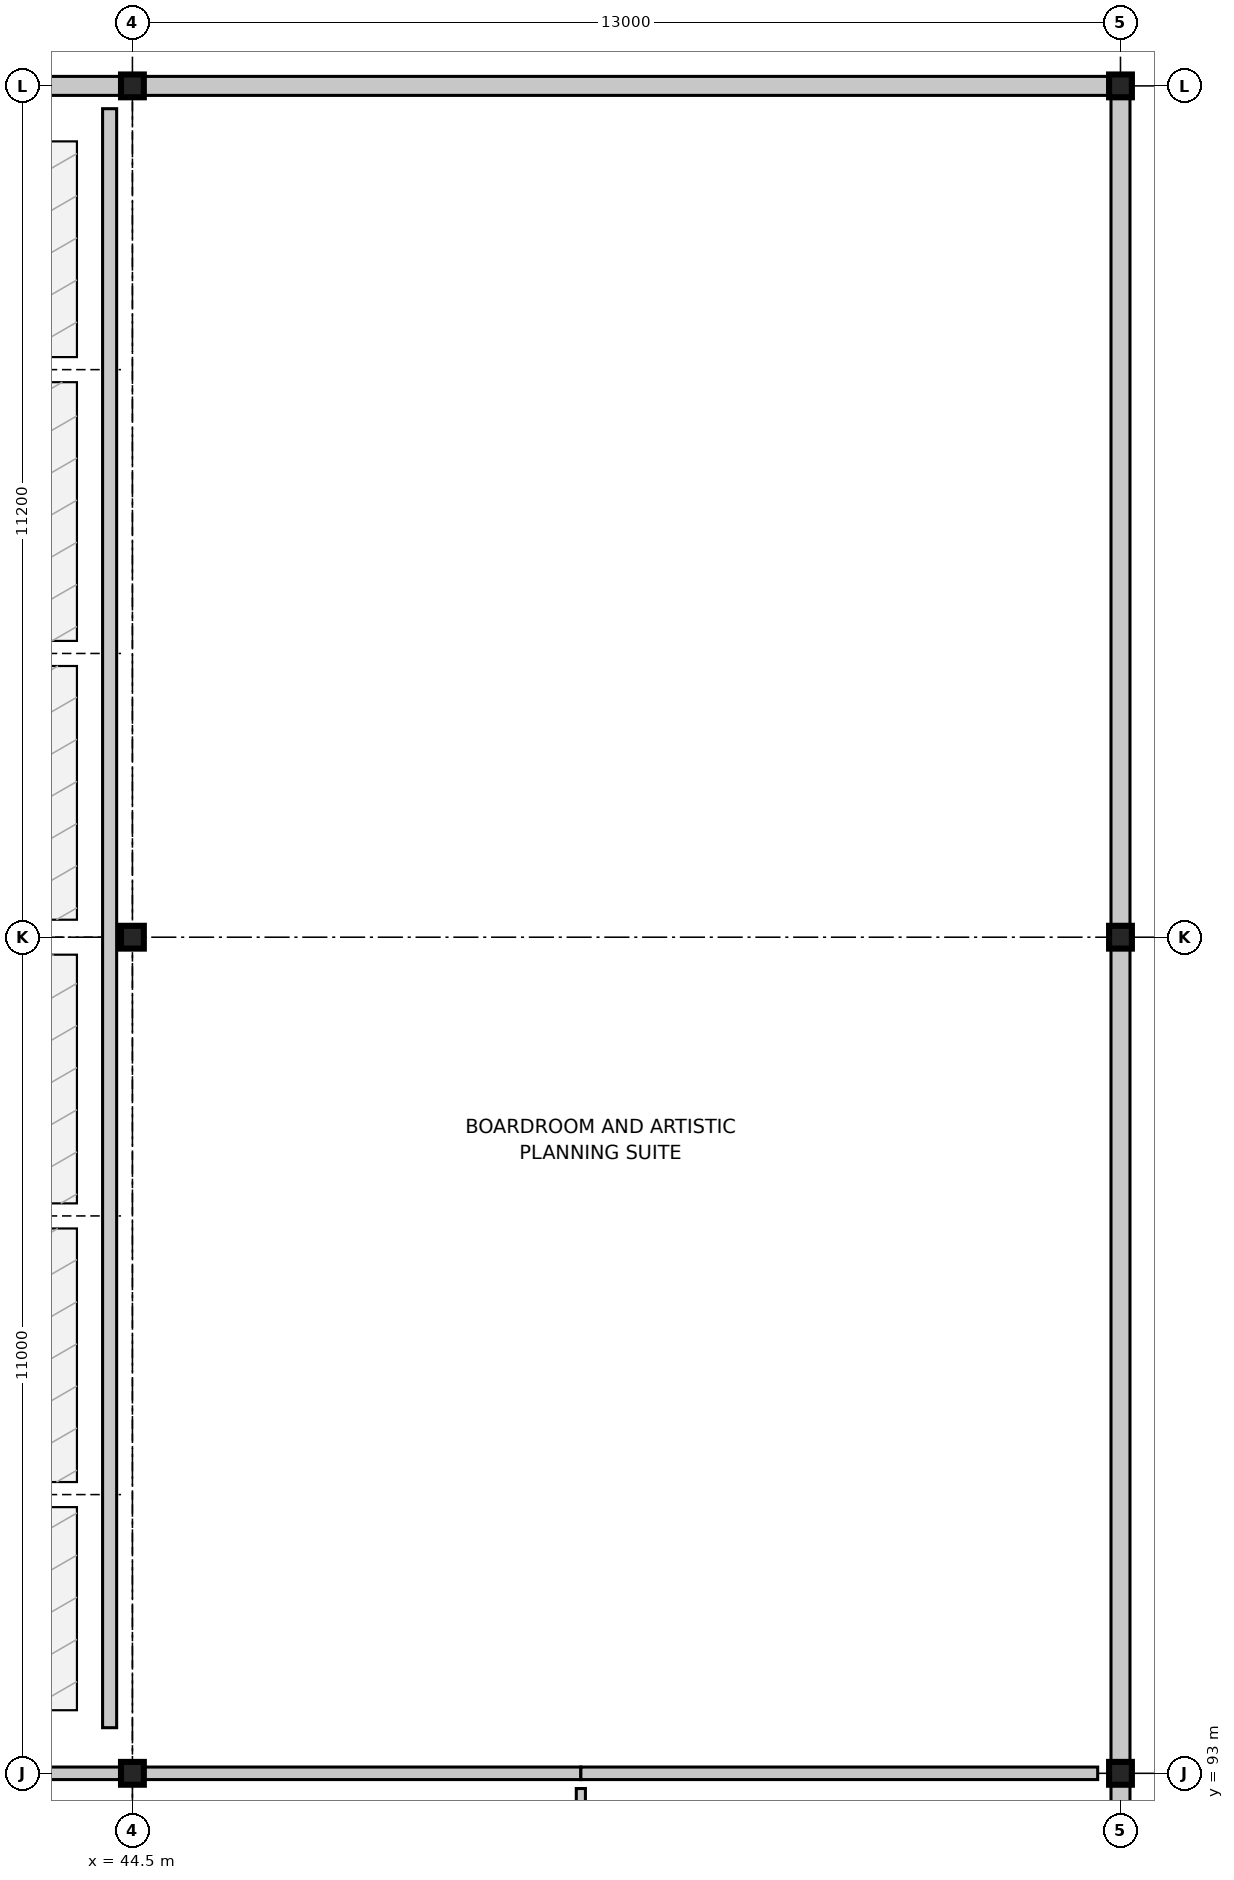
"""IFC4 building model, lengths in metres.
Left out: names, types, materials, properties, quantities, classifications, styles, units other than length and angle.
Written with IfcOpenShell. Run it as: python <this file> out.ifc"""

import sys

from ifc_helpers import new_model, si_unit, direction, frame, frame_2d, origin, origin_2d, place, context, subcontext, project, spatial, rectangle, hollow_rectangle, i_section, extrude, element, fill, save


model = new_model("IFC4")
c1 = context("Model", 3, precision=1e-05, world=origin(), true_north=direction((0.0, 1.0)))
c2 = subcontext(c1, "Body", "Model", "MODEL_VIEW")
j1 = project(units=[si_unit("LENGTHUNIT", "METRE"), si_unit("PLANEANGLEUNIT", "RADIAN")], contexts=[c1])
p1 = place(None, origin())
s1 = spatial("IfcSite", under=j1, at=p1, CompositionType="ELEMENT")
p2 = place(p1, origin())
s2 = spatial("IfcBuilding", under=s1, at=p2, CompositionType="ELEMENT")
p3 = place(p2, frame((0.0, 0.0, 9.6)))
s3 = spatial("IfcBuildingStorey", under=s2, at=p3, CompositionType="ELEMENT", Elevation=9.6)
p4 = place(p3, frame((44.5, 93.0, 0.0), z_axis=(0.0, 0.0, 1.0), x_axis=(1.0, 0.0, 0.0)))
e1 = element("IfcColumn", 1, at=p4, inside=s3, PredefinedType="COLUMN", context=c2, shape_type="SweptSolid", body=[
    extrude(i_section(OverallWidth=0.3, OverallDepth=0.3, WebThickness=0.011, FlangeThickness=0.019, FilletRadius=0.027, at=origin_2d()), origin(), (0.0, 0.0, 1.0), 4.8),
])
p5 = place(p3, frame((44.5, 104.0, 0.0), z_axis=(0.0, 0.0, 1.0), x_axis=(1.0, 0.0, 0.0)))
e2 = element("IfcColumn", 2, at=p5, inside=s3, PredefinedType="COLUMN", context=c2, shape_type="SweptSolid", body=[
    extrude(hollow_rectangle(XDim=0.3, YDim=0.3, WallThickness=0.016, at=origin_2d()), origin(), (0.0, 0.0, 1.0), 4.8),
])
for number, where, z_axis, x_axis in (
    (3, (44.5, 115.2, 0.0), (0.0, 0.0, 1.0), (1.0, 0.0, 0.0)),
    (4, (57.5, 93.0, 0.0), (0.0, 0.0, 1.0), (1.0, 0.0, 0.0)),
    (5, (57.5, 104.0, 0.0), (0.0, 0.0, 1.0), (1.0, 0.0, 0.0)),
):
    element("IfcColumn", number, at=place(p3, frame(where, z_axis=z_axis, x_axis=x_axis)), inside=s3, PredefinedType="COLUMN", context=c2, shape_type="SweptSolid", body=[
        extrude(i_section(OverallWidth=0.3, OverallDepth=0.3, WebThickness=0.011, FlangeThickness=0.019, FilletRadius=0.027, at=origin_2d()), origin(), (0.0, 0.0, 1.0), 4.8),
    ])
p6 = place(p3, frame((57.5, 115.2, 0.0), z_axis=(0.0, 0.0, 1.0), x_axis=(1.0, 0.0, 0.0)))
e6 = element("IfcColumn", 6, at=p6, inside=s3, PredefinedType="COLUMN", context=c2, shape_type="SweptSolid", body=[
    extrude(hollow_rectangle(XDim=0.3, YDim=0.3, WallThickness=0.016, at=origin_2d()), origin(), (0.0, 0.0, 1.0), 4.78),
])
p7 = place(p3, frame((57.5, 92.98, 0.0), z_axis=(0.0, 0.0, 1.0), x_axis=(0.0, -1.0, 0.0)))
e7 = element("IfcWall", 7, at=p7, inside=s3, PredefinedType="SOLIDWALL", context=c2, shape_type="SweptSolid", body=[
    extrude(rectangle(XDim=10.96, YDim=0.25, at=frame_2d((5.48, 0.0))), origin(), (0.0, 0.0, 1.0), 4.028),
])
p8 = place(p3, frame((57.5, 103.98, 0.0), z_axis=(0.0, 0.0, 1.0), x_axis=(0.0, -1.0, 0.0)))
e8 = element("IfcWall", 8, at=p8, inside=s3, PredefinedType="SOLIDWALL", context=c2, shape_type="SweptSolid", body=[
    extrude(rectangle(XDim=10.96, YDim=0.25, at=frame_2d((5.48, 0.0))), origin(), (0.0, 0.0, 1.0), 4.19),
])
p9 = place(p8, frame((4.655, 0.0, 0.9)))
e9 = element("IfcOpeningElement", 9, at=p9, cuts=e8, PredefinedType="OPENING", context=c2, shape_type="SweptSolid", body=[
    extrude(rectangle(XDim=1.65, YDim=1.55, at=frame_2d((0.825, 0.775))), frame((0.0, 0.135, 0.0), z_axis=(0.0, -1.0, 0.0), x_axis=(1.0, 0.0, 0.0)), (0.0, 0.0, 1.0), 0.27),
])
p10 = place(p3, frame((57.5, 115.18, 0.0), z_axis=(0.0, 0.0, 1.0), x_axis=(0.0, -1.0, 0.0)))
e10 = element("IfcWall", 10, at=p10, inside=s3, PredefinedType="SOLIDWALL", context=c2, shape_type="SweptSolid", body=[
    extrude(rectangle(XDim=11.16, YDim=0.25, at=frame_2d((5.58, 0.0))), origin(), (0.0, 0.0, 1.0), 4.19),
])
p11 = place(p10, frame((4.68, 0.0, 0.9)))
e11 = element("IfcOpeningElement", 11, at=p11, cuts=e10, PredefinedType="OPENING", context=c2, shape_type="SweptSolid", body=[
    extrude(rectangle(XDim=1.8, YDim=1.55, at=frame_2d((0.9, 0.775))), frame((0.0, 0.135, 0.0), z_axis=(0.0, -1.0, 0.0), x_axis=(1.0, 0.0, 0.0)), (0.0, 0.0, 1.0), 0.27),
])
p12 = place(p3, frame((44.52, 115.2, 0.0), z_axis=(0.0, 0.0, 1.0), x_axis=(1.0, 0.0, 0.0)))
e12 = element("IfcWall", 12, at=p12, inside=s3, PredefinedType="SOLIDWALL", context=c2, shape_type="SweptSolid", body=[
    extrude(rectangle(XDim=12.96, YDim=0.25, at=frame_2d((6.48, 0.0))), origin(), (0.0, 0.0, 1.0), 4.088),
])
p13 = place(p12, frame((5.48, 0.0, 0.9)))
e13 = element("IfcOpeningElement", 13, at=p13, cuts=e12, PredefinedType="OPENING", context=c2, shape_type="SweptSolid", body=[
    extrude(rectangle(XDim=2.0, YDim=1.55, at=frame_2d((1.0, 0.775))), frame((0.0, 0.135, 0.0), z_axis=(0.0, -1.0, 0.0), x_axis=(1.0, 0.0, 0.0)), (0.0, 0.0, 1.0), 0.27),
])
p14 = place(p3, frame((31.52, 115.2, 0.0), z_axis=(0.0, 0.0, 1.0), x_axis=(1.0, 0.0, 0.0)))
e14 = element("IfcWall", 14, at=p14, inside=s3, PredefinedType="SOLIDWALL", context=c2, shape_type="SweptSolid", body=[
    extrude(rectangle(XDim=12.96, YDim=0.25, at=frame_2d((6.48, 0.0))), origin(), (0.0, 0.0, 1.0), 4.088),
])
p15 = place(p14, frame((5.38, 0.0, 0.9)))
e15 = element("IfcOpeningElement", 15, at=p15, cuts=e14, PredefinedType="OPENING", context=c2, shape_type="SweptSolid", body=[
    extrude(rectangle(XDim=2.2, YDim=1.55, at=frame_2d((1.1, 0.775))), frame((0.0, 0.135, 0.0), z_axis=(0.0, -1.0, 0.0), x_axis=(1.0, 0.0, 0.0)), (0.0, 0.0, 1.0), 0.27),
])
p16 = place(p3, frame((42.6, 93.0, 0.0), z_axis=(0.0, 0.0, 1.0), x_axis=(1.0, 0.0, 0.0)))
e16 = element("IfcWall", 16, at=p16, inside=s3, PredefinedType="PARTITIONING", context=c2, shape_type="SweptSolid", body=[
    extrude(rectangle(XDim=7.8, YDim=0.165, at=frame_2d((3.9, 0.0))), origin(), (0.0, 0.0, 1.0), 4.09),
])
p17 = place(p16, frame((3.44, 0.0, 0.0)))
e17 = element("IfcOpeningElement", 17, at=p17, cuts=e16, PredefinedType="OPENING", context=c2, shape_type="SweptSolid", body=[
    extrude(rectangle(XDim=0.92, YDim=2.1, at=frame_2d((0.46, 1.05))), frame((0.0, 0.093, 0.0), z_axis=(0.0, -1.0, 0.0), x_axis=(1.0, 0.0, 0.0)), (0.0, 0.0, 1.0), 0.185),
])
p18 = place(p3, frame((50.4, 93.0, 0.0), z_axis=(0.0, 0.0, 1.0), x_axis=(1.0, 0.0, 0.0)))
e18 = element("IfcWall", 18, at=p18, inside=s3, PredefinedType="PARTITIONING", context=c2, shape_type="SweptSolid", body=[
    extrude(rectangle(XDim=6.8, YDim=0.165, at=frame_2d((3.4, 0.0))), origin(), (0.0, 0.0, 1.0), 4.544),
])
p19 = place(p18, frame((2.96, 0.0, 0.0)))
e19 = element("IfcOpeningElement", 19, at=p19, cuts=e18, PredefinedType="OPENING", context=c2, shape_type="SweptSolid", body=[
    extrude(rectangle(XDim=0.88, YDim=2.1, at=frame_2d((0.44, 1.05))), frame((0.0, 0.093, 0.0), z_axis=(0.0, -1.0, 0.0), x_axis=(1.0, 0.0, 0.0)), (0.0, 0.0, 1.0), 0.185),
])
p20 = place(p3, frame((50.4, 81.6, 0.0), z_axis=(0.0, 0.0, 1.0), x_axis=(0.0, 1.0, 0.0)))
e20 = element("IfcWall", 20, at=p20, inside=s3, PredefinedType="PARTITIONING", context=c2, shape_type="SweptSolid", body=[
    extrude(rectangle(XDim=11.2, YDim=0.12, at=frame_2d((5.6, 0.0))), origin(), (0.0, 0.0, 1.0), 4.03),
])
p21 = place(p3, frame((44.2, 93.6, 0.0), z_axis=(0.0, 0.0, 1.0), x_axis=(0.0, 1.0, 0.0)))
e21 = element("IfcWall", 21, at=p21, inside=s3, PredefinedType="PARTITIONING", context=c2, shape_type="SweptSolid", body=[
    extrude(rectangle(XDim=21.3, YDim=0.185, at=frame_2d((10.65, 0.0))), origin(), (0.0, 0.0, 1.0), 4.09),
])
p22 = place(p21, frame((5.23, 0.0, 0.0)))
e22 = element("IfcOpeningElement", 22, at=p22, cuts=e21, PredefinedType="OPENING", context=c2, shape_type="SweptSolid", body=[
    extrude(rectangle(XDim=1.1, YDim=2.15, at=frame_2d((0.55, 1.075))), frame((0.0, 0.103, 0.0), z_axis=(0.0, -1.0, 0.0), x_axis=(1.0, 0.0, 0.0)), (0.0, 0.0, 1.0), 0.205),
])
p23 = place(p9, origin())
e23 = element("IfcWindow", 23, at=p23, inside=s3, PartitioningType="SINGLE_PANEL", PredefinedType="WINDOW", context=c2, shape_type="SweptSolid", body=[
    extrude(rectangle(XDim=1.65, YDim=1.55, at=frame_2d((0.825, 0.775))), frame((0.0, 0.03, 0.0), z_axis=(0.0, -1.0, 0.0), x_axis=(1.0, 0.0, 0.0)), (0.0, 0.0, 1.0), 0.06),
])
fill(e9, e23)
p24 = place(p11, origin())
e24 = element("IfcWindow", 24, at=p24, inside=s3, PartitioningType="SINGLE_PANEL", PredefinedType="WINDOW", context=c2, shape_type="SweptSolid", body=[
    extrude(rectangle(XDim=1.8, YDim=1.55, at=frame_2d((0.9, 0.775))), frame((0.0, 0.03, 0.0), z_axis=(0.0, -1.0, 0.0), x_axis=(1.0, 0.0, 0.0)), (0.0, 0.0, 1.0), 0.06),
])
fill(e11, e24)
p25 = place(p13, origin())
e25 = element("IfcWindow", 25, at=p25, inside=s3, PartitioningType="SINGLE_PANEL", PredefinedType="WINDOW", context=c2, shape_type="SweptSolid", body=[
    extrude(rectangle(XDim=2.0, YDim=1.55, at=frame_2d((1.0, 0.775))), frame((0.0, 0.03, 0.0), z_axis=(0.0, -1.0, 0.0), x_axis=(1.0, 0.0, 0.0)), (0.0, 0.0, 1.0), 0.06),
])
fill(e13, e25)
p26 = place(p17, origin())
e26 = element("IfcDoor", 26, at=p26, inside=s3, OperationType="SINGLE_SWING_RIGHT", PredefinedType="DOOR", context=c2, shape_type="SweptSolid", body=[
    extrude(rectangle(XDim=0.92, YDim=2.1, at=frame_2d((0.46, 1.05))), frame((0.0, 0.025, 0.0), z_axis=(0.0, -1.0, 0.0), x_axis=(1.0, 0.0, 0.0)), (0.0, 0.0, 1.0), 0.05),
])
fill(e17, e26)
p27 = place(p19, origin())
e27 = element("IfcDoor", 27, at=p27, inside=s3, OperationType="SINGLE_SWING_LEFT", PredefinedType="DOOR", context=c2, shape_type="SweptSolid", body=[
    extrude(rectangle(XDim=0.88, YDim=2.1, at=frame_2d((0.44, 1.05))), frame((0.0, 0.025, 0.0), z_axis=(0.0, -1.0, 0.0), x_axis=(1.0, 0.0, 0.0)), (0.0, 0.0, 1.0), 0.05),
])
fill(e19, e27)
p28 = place(p22, origin())
e28 = element("IfcDoor", 28, at=p28, inside=s3, OperationType="SINGLE_SWING_LEFT", PredefinedType="DOOR", context=c2, shape_type="SweptSolid", body=[
    extrude(rectangle(XDim=1.1, YDim=2.15, at=frame_2d((0.55, 1.075))), frame((0.0, 0.025, 0.0), z_axis=(0.0, -1.0, 0.0), x_axis=(1.0, 0.0, 0.0)), (0.0, 0.0, 1.0), 0.05),
])
fill(e22, e28)
save(model, sys.argv[1])
